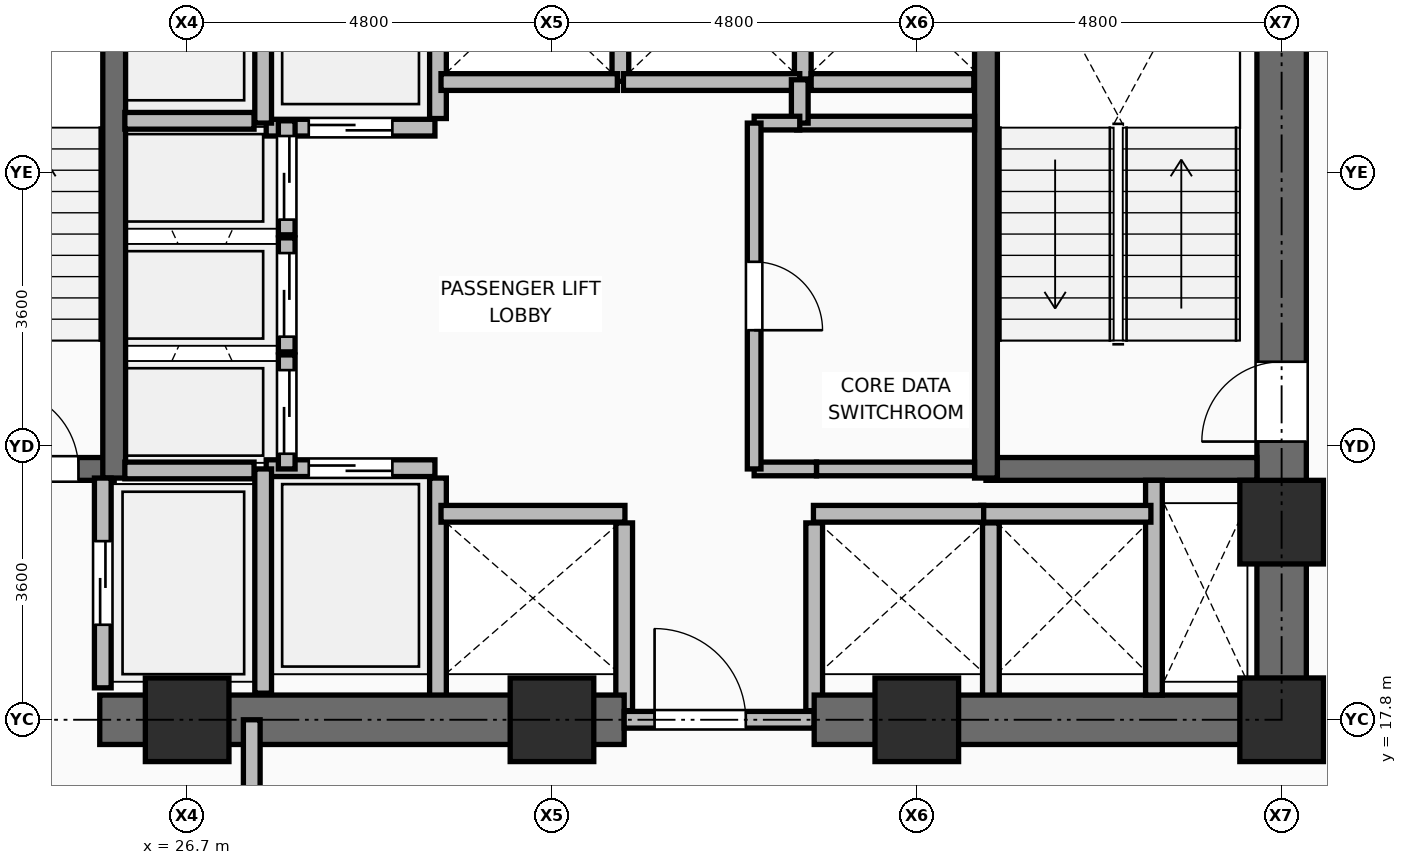
"""IFC4 building model, lengths in metres.
Left out: names, types, materials, properties, quantities, classifications, styles, units other than length and angle.
Written with IfcOpenShell. Run it as: python <this file> out.ifc"""

import sys

from ifc_helpers import new_model, si_unit, direction, frame, frame_2d, origin, origin_2d, place, context, subcontext, project, spatial, rectangle, extrude, element, fill, save


model = new_model("IFC4")
c1 = context("Model", 3, precision=1e-05, world=origin(), true_north=direction((0.0, 1.0)))
c2 = subcontext(c1, "Body", "Model", "MODEL_VIEW")
j1 = project(units=[si_unit("LENGTHUNIT", "METRE"), si_unit("PLANEANGLEUNIT", "RADIAN")], contexts=[c1])
p1 = place(None, origin())
s1 = spatial("IfcSite", under=j1, at=p1, CompositionType="ELEMENT")
p2 = place(p1, origin())
s2 = spatial("IfcBuilding", under=s1, at=p2, CompositionType="ELEMENT")
p3 = place(p2, frame((0.0, 0.0, 75.75)))
s3 = spatial("IfcBuildingStorey", under=s2, at=p3, CompositionType="ELEMENT", Elevation=75.75)
for number, where, z_axis, x_axis in (
    (1, (26.7, 17.8, 0.0), (0.0, 0.0, 1.0), (1.0, 0.0, 0.0)),
    (2, (31.5, 17.8, 0.0), (0.0, 0.0, 1.0), (1.0, 0.0, 0.0)),
    (3, (36.3, 17.8, 0.0), (0.0, 0.0, 1.0), (1.0, 0.0, 0.0)),
    (4, (41.1, 17.8, 0.0), (0.0, 0.0, 1.0), (1.0, 0.0, 0.0)),
    (5, (41.1, 20.4, 0.0), (0.0, 0.0, 1.0), (1.0, 0.0, 0.0)),
):
    element("IfcColumn", number, at=place(p3, frame(where, z_axis=z_axis, x_axis=x_axis)), inside=s3, PredefinedType="COLUMN", context=c2, shape_type="SweptSolid", body=[
        extrude(rectangle(XDim=1.1, YDim=1.1, at=origin_2d()), origin(), (0.0, 0.0, 1.0), 3.75),
    ])
p4 = place(p3, frame((30.0, 18.08, 0.0), z_axis=(0.0, 0.0, 1.0), x_axis=(0.0, 1.0, 0.0)))
e6 = element("IfcWall", 6, at=p4, inside=s3, PredefinedType="PARTITIONING", context=c2, shape_type="SweptSolid", body=[
    extrude(rectangle(XDim=2.9, YDim=0.22, at=frame_2d((1.45, 0.0))), origin(), (0.0, 0.0, 1.0), 3.545),
])
for number, where, z_axis, x_axis in (
    (7, (32.45, 17.92, 0.0), (0.0, 0.0, 1.0), (0.0, 1.0, 0.0)),
    (8, (34.95, 17.92, 0.0), (0.0, 0.0, 1.0), (0.0, 1.0, 0.0)),
):
    element("IfcWall", number, at=place(p3, frame(where, z_axis=z_axis, x_axis=x_axis)), inside=s3, PredefinedType="PARTITIONING", context=c2, shape_type="SweptSolid", body=[
        extrude(rectangle(XDim=2.47, YDim=0.22, at=frame_2d((1.235, 0.0))), origin(), (0.0, 0.0, 1.0), 2.928),
    ])
p5 = place(p3, frame((37.275, 18.08, 0.0), z_axis=(0.0, 0.0, 1.0), x_axis=(0.0, 1.0, 0.0)))
e9 = element("IfcWall", 9, at=p5, inside=s3, PredefinedType="PARTITIONING", context=c2, shape_type="SweptSolid", body=[
    extrude(rectangle(XDim=2.31, YDim=0.22, at=frame_2d((1.155, 0.0))), origin(), (0.0, 0.0, 1.0), 3.545),
])
p6 = place(p3, frame((30.0, 25.71, 0.0), z_axis=(0.0, 0.0, 1.0), x_axis=(0.0, 1.0, 0.0)))
e10 = element("IfcWall", 10, at=p6, inside=s3, PredefinedType="PARTITIONING", context=c2, shape_type="SweptSolid", body=[
    extrude(rectangle(XDim=2.73, YDim=0.22, at=frame_2d((1.365, 0.0))), origin(), (0.0, 0.0, 1.0), 3.545),
])
p7 = place(p3, frame((32.4, 26.2, 0.0), z_axis=(0.0, 0.0, 1.0), x_axis=(0.0, 1.0, 0.0)))
e11 = element("IfcWall", 11, at=p7, inside=s3, PredefinedType="PARTITIONING", context=c2, shape_type="SweptSolid", body=[
    extrude(rectangle(XDim=2.24, YDim=0.22, at=frame_2d((1.12, 0.0))), origin(), (0.0, 0.0, 1.0), 3.545),
])
p8 = place(p3, frame((34.8, 26.23, 0.0), z_axis=(0.0, 0.0, 1.0), x_axis=(0.0, 1.0, 0.0)))
e12 = element("IfcWall", 12, at=p8, inside=s3, PredefinedType="PARTITIONING", context=c2, shape_type="SweptSolid", body=[
    extrude(rectangle(XDim=2.21, YDim=0.22, at=frame_2d((1.105, 0.0))), origin(), (0.0, 0.0, 1.0), 3.545),
])
p9 = place(p3, frame((34.91, 26.19, 0.0), z_axis=(0.0, 0.0, 1.0), x_axis=(1.0, 0.0, 0.0)))
e13 = element("IfcWall", 13, at=p9, inside=s3, PredefinedType="PARTITIONING", context=c2, shape_type="SweptSolid", body=[
    extrude(rectangle(XDim=2.14, YDim=0.22, at=frame_2d((1.07, 0.0))), origin(), (0.0, 0.0, 1.0), 3.545),
])
p10 = place(p3, frame((25.55, 17.8, 0.0), z_axis=(0.0, 0.0, 1.0), x_axis=(1.0, 0.0, 0.0)))
e14 = element("IfcWall", 14, at=p10, inside=s3, PredefinedType="SHEAR", context=c2, shape_type="SweptSolid", body=[
    extrude(rectangle(XDim=6.9, YDim=0.65, at=frame_2d((3.45, 0.0))), origin(), (0.0, 0.0, 1.0), 3.57),
])
p11 = place(p3, frame((32.45, 17.8, 0.0), z_axis=(0.0, 0.0, 1.0), x_axis=(1.0, 0.0, 0.0)))
e15 = element("IfcWall", 15, at=p11, inside=s3, PredefinedType="PARTITIONING", context=c2, shape_type="SweptSolid", body=[
    extrude(rectangle(XDim=2.5, YDim=0.22, at=frame_2d((1.25, 0.0))), origin(), (0.0, 0.0, 1.0), 2.928),
])
p12 = place(p11, frame((0.4, 0.0, 0.0)))
e16 = element("IfcOpeningElement", 16, at=p12, cuts=e15, PredefinedType="OPENING", context=c2, shape_type="SweptSolid", body=[
    extrude(rectangle(XDim=1.2, YDim=2.1, at=frame_2d((0.6, 1.05))), frame((0.0, 0.12, 0.0), z_axis=(0.0, -1.0, 0.0), x_axis=(1.0, 0.0, 0.0)), (0.0, 0.0, 1.0), 0.24),
])
p13 = place(p3, frame((34.95, 17.8, 0.0), z_axis=(0.0, 0.0, 1.0), x_axis=(1.0, 0.0, 0.0)))
e17 = element("IfcWall", 17, at=p13, inside=s3, PredefinedType="SHEAR", context=c2, shape_type="SweptSolid", body=[
    extrude(rectangle(XDim=6.475, YDim=0.65, at=frame_2d((3.238, 0.0))), origin(), (0.0, 0.0, 1.0), 3.57),
])
p14 = place(p3, frame((41.1, 18.125, 0.0), z_axis=(0.0, 0.0, 1.0), x_axis=(0.0, 1.0, 0.0)))
e18 = element("IfcWall", 18, at=p14, inside=s3, PredefinedType="SHEAR", context=c2, shape_type="SweptSolid", body=[
    extrude(rectangle(XDim=14.0, YDim=0.65, at=frame_2d((7.0, 0.0))), origin(), (0.0, 0.0, 1.0), 3.57),
])
p15 = place(p14, frame((3.335, 0.0, 0.0)))
e19 = element("IfcOpeningElement", 19, at=p15, cuts=e18, PredefinedType="OPENING", context=c2, shape_type="SweptSolid", body=[
    extrude(rectangle(XDim=1.05, YDim=2.1, at=frame_2d((0.525, 1.05))), frame((0.0, 0.335, 0.0), z_axis=(0.0, -1.0, 0.0), x_axis=(1.0, 0.0, 0.0)), (0.0, 0.0, 1.0), 0.67),
])
p16 = place(p3, frame((22.225, 21.1, 0.0), z_axis=(0.0, 0.0, 1.0), x_axis=(1.0, 0.0, 0.0)))
e20 = element("IfcWall", 20, at=p16, inside=s3, PredefinedType="SHEAR", context=c2, shape_type="SweptSolid", body=[
    extrude(rectangle(XDim=3.515, YDim=0.3, at=frame_2d((1.757, 0.0))), origin(), (0.0, 0.0, 1.0), 3.57),
])
p17 = place(p16, frame((1.995, 0.0, 0.0)))
e21 = element("IfcOpeningElement", 21, at=p17, cuts=e20, PredefinedType="OPENING", context=c2, shape_type="SweptSolid", body=[
    extrude(rectangle(XDim=1.05, YDim=2.1, at=frame_2d((0.525, 1.05))), frame((0.0, 0.16, 0.0), z_axis=(0.0, -1.0, 0.0), x_axis=(1.0, 0.0, 0.0)), (0.0, 0.0, 1.0), 0.32),
])
p18 = place(p3, frame((25.74, 20.98, 0.0), z_axis=(0.0, 0.0, 1.0), x_axis=(0.0, 1.0, 0.0)))
e22 = element("IfcWall", 22, at=p18, inside=s3, PredefinedType="SHEAR", context=c2, shape_type="SweptSolid", body=[
    extrude(rectangle(XDim=7.99, YDim=0.3, at=frame_2d((3.995, 0.0))), origin(), (0.0, 0.0, 1.0), 3.57),
])
p19 = place(p3, frame((37.21, 21.1, 0.0), z_axis=(0.0, 0.0, 1.0), x_axis=(1.0, 0.0, 0.0)))
e23 = element("IfcWall", 23, at=p19, inside=s3, PredefinedType="SHEAR", context=c2, shape_type="SweptSolid", body=[
    extrude(rectangle(XDim=3.565, YDim=0.3, at=frame_2d((1.782, 0.0))), origin(), (0.0, 0.0, 1.0), 3.57),
])
p20 = place(p3, frame((37.21, 20.98, 0.0), z_axis=(0.0, 0.0, 1.0), x_axis=(0.0, 1.0, 0.0)))
e24 = element("IfcWall", 24, at=p20, inside=s3, PredefinedType="SHEAR", context=c2, shape_type="SweptSolid", body=[
    extrude(rectangle(XDim=7.99, YDim=0.3, at=frame_2d((3.995, 0.0))), origin(), (0.0, 0.0, 1.0), 3.57),
])
p21 = place(p3, frame((39.42, 18.125, 0.0), z_axis=(0.0, 0.0, 1.0), x_axis=(0.0, 1.0, 0.0)))
e25 = element("IfcWall", 25, at=p21, inside=s3, PredefinedType="PARTITIONING", context=c2, shape_type="SweptSolid", body=[
    extrude(rectangle(XDim=2.825, YDim=0.22, at=frame_2d((1.413, 0.0))), origin(), (0.0, 0.0, 1.0), 3.55),
])
p22 = place(p3, frame((25.59, 18.22, 0.0), z_axis=(0.0, 0.0, 1.0), x_axis=(0.0, 1.0, 0.0)))
e26 = element("IfcWall", 26, at=p22, inside=s3, PredefinedType="PARTITIONING", context=c2, shape_type="SweptSolid", body=[
    extrude(rectangle(XDim=2.76, YDim=0.22, at=frame_2d((1.38, 0.0))), origin(), (0.0, 0.0, 1.0), 3.55),
])
p23 = place(p22, frame((0.83, 0.0, 0.0)))
e27 = element("IfcOpeningElement", 27, at=p23, cuts=e26, PredefinedType="OPENING", context=c2, shape_type="SweptSolid", body=[
    extrude(rectangle(XDim=1.1, YDim=2.2, at=frame_2d((0.55, 1.1))), frame((0.0, 0.12, 0.0), z_axis=(0.0, -1.0, 0.0), x_axis=(1.0, 0.0, 0.0)), (0.0, 0.0, 1.0), 0.24),
])
p24 = place(p3, frame((27.74, 21.11, 0.0), z_axis=(0.0, 0.0, 1.0), x_axis=(1.0, 0.0, 0.0)))
e28 = element("IfcWall", 28, at=p24, inside=s3, PredefinedType="PARTITIONING", context=c2, shape_type="SweptSolid", body=[
    extrude(rectangle(XDim=2.22, YDim=0.22, at=frame_2d((1.11, 0.0))), origin(), (0.0, 0.0, 1.0), 3.55),
])
p25 = place(p24, frame((0.56, 0.0, 0.0)))
e29 = element("IfcOpeningElement", 29, at=p25, cuts=e28, PredefinedType="OPENING", context=c2, shape_type="SweptSolid", body=[
    extrude(rectangle(XDim=1.1, YDim=2.2, at=frame_2d((0.55, 1.1))), frame((0.0, 0.12, 0.0), z_axis=(0.0, -1.0, 0.0), x_axis=(1.0, 0.0, 0.0)), (0.0, 0.0, 1.0), 0.24),
])
p26 = place(p3, frame((27.74, 25.59, 0.0), z_axis=(0.0, 0.0, 1.0), x_axis=(1.0, 0.0, 0.0)))
e30 = element("IfcWall", 30, at=p26, inside=s3, PredefinedType="PARTITIONING", context=c2, shape_type="SweptSolid", body=[
    extrude(rectangle(XDim=2.22, YDim=0.22, at=frame_2d((1.11, 0.0))), origin(), (0.0, 0.0, 1.0), 3.55),
])
p27 = place(p26, frame((0.56, 0.0, 0.0)))
e31 = element("IfcOpeningElement", 31, at=p27, cuts=e30, PredefinedType="OPENING", context=c2, shape_type="SweptSolid", body=[
    extrude(rectangle(XDim=1.1, YDim=2.2, at=frame_2d((0.55, 1.1))), frame((0.0, 0.12, 0.0), z_axis=(0.0, -1.0, 0.0), x_axis=(1.0, 0.0, 0.0)), (0.0, 0.0, 1.0), 0.24),
])
p28 = place(p3, frame((30.04, 20.51, 0.0), z_axis=(0.0, 0.0, 1.0), x_axis=(1.0, 0.0, 0.0)))
e32 = element("IfcWall", 32, at=p28, inside=s3, PredefinedType="PARTITIONING", context=c2, shape_type="SweptSolid", body=[
    extrude(rectangle(XDim=2.42, YDim=0.22, at=frame_2d((1.21, 0.0))), origin(), (0.0, 0.0, 1.0), 3.55),
])
for number, where, z_axis, x_axis in (
    (33, (37.14, 20.51, 0.0), (0.0, 0.0, 1.0), (1.0, 0.0, 0.0)),
    (34, (34.94, 20.51, 0.0), (0.0, 0.0, 1.0), (1.0, 0.0, 0.0)),
):
    element("IfcWall", number, at=place(p3, frame(where, z_axis=z_axis, x_axis=x_axis)), inside=s3, PredefinedType="PARTITIONING", context=c2, shape_type="SweptSolid", body=[
        extrude(rectangle(XDim=2.24, YDim=0.22, at=frame_2d((1.12, 0.0))), origin(), (0.0, 0.0, 1.0), 3.55),
    ])
for number, where, z_axis, x_axis in (
    (35, (30.04, 26.19, 0.0), (0.0, 0.0, 1.0), (1.0, 0.0, 0.0)),
    (36, (32.44, 26.19, 0.0), (0.0, 0.0, 1.0), (1.0, 0.0, 0.0)),
):
    element("IfcWall", number, at=place(p3, frame(where, z_axis=z_axis, x_axis=x_axis)), inside=s3, PredefinedType="PARTITIONING", context=c2, shape_type="SweptSolid", body=[
        extrude(rectangle(XDim=2.32, YDim=0.22, at=frame_2d((1.16, 0.0))), origin(), (0.0, 0.0, 1.0), 3.55),
    ])
p29 = place(p3, frame((28.01, 21.1, 0.0), z_axis=(0.0, 0.0, 1.0), x_axis=(0.0, 1.0, 0.0)))
e37 = element("IfcWall", 37, at=p29, inside=s3, PredefinedType="PARTITIONING", context=c2, shape_type="SweptSolid", body=[
    extrude(rectangle(XDim=1.5, YDim=0.22, at=frame_2d((0.75, 0.0))), origin(), (0.0, 0.0, 1.0), 3.55),
])
p30 = place(p29, frame((0.2, 0.0, 0.0)))
e38 = element("IfcOpeningElement", 38, at=p30, cuts=e37, PredefinedType="OPENING", context=c2, shape_type="SweptSolid", body=[
    extrude(rectangle(XDim=1.1, YDim=2.2, at=frame_2d((0.55, 1.1))), frame((0.0, 0.12, 0.0), z_axis=(0.0, -1.0, 0.0), x_axis=(1.0, 0.0, 0.0)), (0.0, 0.0, 1.0), 0.24),
])
p31 = place(p3, frame((28.01, 22.64, 0.0), z_axis=(0.0, 0.0, 1.0), x_axis=(0.0, 1.0, 0.0)))
e39 = element("IfcWall", 39, at=p31, inside=s3, PredefinedType="PARTITIONING", context=c2, shape_type="SweptSolid", body=[
    extrude(rectangle(XDim=1.5, YDim=0.22, at=frame_2d((0.75, 0.0))), origin(), (0.0, 0.0, 1.0), 3.55),
])
p32 = place(p31, frame((0.2, 0.0, 0.0)))
e40 = element("IfcOpeningElement", 40, at=p32, cuts=e39, PredefinedType="OPENING", context=c2, shape_type="SweptSolid", body=[
    extrude(rectangle(XDim=1.1, YDim=2.2, at=frame_2d((0.55, 1.1))), frame((0.0, 0.12, 0.0), z_axis=(0.0, -1.0, 0.0), x_axis=(1.0, 0.0, 0.0)), (0.0, 0.0, 1.0), 0.24),
])
p33 = place(p3, frame((28.01, 24.18, 0.0), z_axis=(0.0, 0.0, 1.0), x_axis=(0.0, 1.0, 0.0)))
e41 = element("IfcWall", 41, at=p33, inside=s3, PredefinedType="PARTITIONING", context=c2, shape_type="SweptSolid", body=[
    extrude(rectangle(XDim=1.5, YDim=0.22, at=frame_2d((0.75, 0.0))), origin(), (0.0, 0.0, 1.0), 3.55),
])
p34 = place(p33, frame((0.2, 0.0, 0.0)))
e42 = element("IfcOpeningElement", 42, at=p34, cuts=e41, PredefinedType="OPENING", context=c2, shape_type="SweptSolid", body=[
    extrude(rectangle(XDim=1.1, YDim=2.2, at=frame_2d((0.55, 1.1))), frame((0.0, 0.12, 0.0), z_axis=(0.0, -1.0, 0.0), x_axis=(1.0, 0.0, 0.0)), (0.0, 0.0, 1.0), 0.24),
])
p35 = place(p3, frame((27.7, 18.15, 0.0), z_axis=(0.0, 0.0, 1.0), x_axis=(0.0, 1.0, 0.0)))
e43 = element("IfcWall", 43, at=p35, inside=s3, PredefinedType="PARTITIONING", context=c2, shape_type="SweptSolid", body=[
    extrude(rectangle(XDim=2.95, YDim=0.22, at=frame_2d((1.475, 0.0))), origin(), (0.0, 0.0, 1.0), 3.55),
])
p36 = place(p3, frame((27.7, 25.65, 0.0), z_axis=(0.0, 0.0, 1.0), x_axis=(0.0, 1.0, 0.0)))
e44 = element("IfcWall", 44, at=p36, inside=s3, PredefinedType="PARTITIONING", context=c2, shape_type="SweptSolid", body=[
    extrude(rectangle(XDim=3.0, YDim=0.22, at=frame_2d((1.5, 0.0))), origin(), (0.0, 0.0, 1.0), 3.55),
])
for number, where, z_axis, x_axis in (
    (45, (25.88, 21.08, 0.0), (0.0, 0.0, 1.0), (1.0, 0.0, 0.0)),
    (46, (25.88, 25.68, 0.0), (0.0, 0.0, 1.0), (1.0, 0.0, 0.0)),
):
    element("IfcWall", number, at=place(p3, frame(where, z_axis=z_axis, x_axis=x_axis)), inside=s3, PredefinedType="PARTITIONING", context=c2, shape_type="SweptSolid", body=[
        extrude(rectangle(XDim=1.7, YDim=0.22, at=frame_2d((0.85, 0.0))), origin(), (0.0, 0.0, 1.0), 3.55),
    ])
p37 = place(p3, frame((34.98, 21.1, 0.0), z_axis=(0.0, 0.0, 1.0), x_axis=(1.0, 0.0, 0.0)))
e47 = element("IfcWall", 47, at=p37, inside=s3, PredefinedType="PARTITIONING", context=c2, shape_type="SweptSolid", body=[
    extrude(rectangle(XDim=2.08, YDim=0.18, at=frame_2d((1.04, 0.0))), origin(), (0.0, 0.0, 1.0), 3.55),
])
p38 = place(p3, frame((34.72, 25.65, 0.0), z_axis=(0.0, 0.0, 1.0), x_axis=(1.0, 0.0, 0.0)))
e48 = element("IfcWall", 48, at=p38, inside=s3, PredefinedType="PARTITIONING", context=c2, shape_type="SweptSolid", body=[
    extrude(rectangle(XDim=2.34, YDim=0.18, at=frame_2d((1.17, 0.0))), origin(), (0.0, 0.0, 1.0), 3.55),
])
p39 = place(p3, frame((34.76, 25.65, 0.0), z_axis=(0.0, 0.0, 1.0), x_axis=(0.0, 1.0, 0.0)))
e49 = element("IfcWall", 49, at=p39, inside=s3, PredefinedType="PARTITIONING", context=c2, shape_type="SweptSolid", body=[
    extrude(rectangle(XDim=0.57, YDim=0.22, at=frame_2d((0.285, 0.0))), origin(), (0.0, 0.0, 1.0), 3.55),
])
p40 = place(p3, frame((34.16, 21.1, 0.0), z_axis=(0.0, 0.0, 1.0), x_axis=(1.0, 0.0, 0.0)))
e50 = element("IfcWall", 50, at=p40, inside=s3, PredefinedType="PARTITIONING", context=c2, shape_type="SweptSolid", body=[
    extrude(rectangle(XDim=0.82, YDim=0.18, at=frame_2d((0.41, 0.0))), origin(), (0.0, 0.0, 1.0), 3.55),
])
p41 = place(p3, frame((34.16, 25.65, 0.0), z_axis=(0.0, 0.0, 1.0), x_axis=(1.0, 0.0, 0.0)))
e51 = element("IfcWall", 51, at=p41, inside=s3, PredefinedType="PARTITIONING", context=c2, shape_type="SweptSolid", body=[
    extrude(rectangle(XDim=0.6, YDim=0.18, at=frame_2d((0.3, 0.0))), origin(), (0.0, 0.0, 1.0), 3.55),
])
p42 = place(p3, frame((34.16, 21.1, 0.0), z_axis=(0.0, 0.0, 1.0), x_axis=(0.0, 1.0, 0.0)))
e52 = element("IfcWall", 52, at=p42, inside=s3, PredefinedType="PARTITIONING", context=c2, shape_type="SweptSolid", body=[
    extrude(rectangle(XDim=4.55, YDim=0.18, at=frame_2d((2.275, 0.0))), origin(), (0.0, 0.0, 1.0), 3.55),
])
p43 = place(p42, frame((1.825, 0.0, 0.0)))
e53 = element("IfcOpeningElement", 53, at=p43, cuts=e52, PredefinedType="OPENING", context=c2, shape_type="SweptSolid", body=[
    extrude(rectangle(XDim=0.9, YDim=2.1, at=frame_2d((0.45, 1.05))), frame((0.0, 0.1, 0.0), z_axis=(0.0, -1.0, 0.0), x_axis=(1.0, 0.0, 0.0)), (0.0, 0.0, 1.0), 0.2),
])
p44 = place(p3, frame((27.55, 14.35, 0.0), z_axis=(0.0, 0.0, 1.0), x_axis=(0.0, 1.0, 0.0)))
e54 = element("IfcWall", 54, at=p44, inside=s3, PredefinedType="PARTITIONING", context=c2, shape_type="SweptSolid", body=[
    extrude(rectangle(XDim=3.45, YDim=0.22, at=frame_2d((1.725, 0.0))), origin(), (0.0, 0.0, 1.0), 2.928),
])
p45 = place(p44, frame((1.175, 0.0, 0.0)))
e55 = element("IfcOpeningElement", 55, at=p45, cuts=e54, PredefinedType="OPENING", context=c2, shape_type="SweptSolid", body=[
    extrude(rectangle(XDim=1.1, YDim=2.1, at=frame_2d((0.55, 1.05))), frame((0.0, 0.12, 0.0), z_axis=(0.0, -1.0, 0.0), x_axis=(1.0, 0.0, 0.0)), (0.0, 0.0, 1.0), 0.24),
])
p46 = place(p12, origin())
e56 = element("IfcDoor", 56, at=p46, inside=s3, OperationType="SINGLE_SWING_LEFT", PredefinedType="DOOR", context=c2, shape_type="SweptSolid", body=[
    extrude(rectangle(XDim=1.2, YDim=2.1, at=frame_2d((0.6, 1.05))), frame((0.0, 0.025, 0.0), z_axis=(0.0, -1.0, 0.0), x_axis=(1.0, 0.0, 0.0)), (0.0, 0.0, 1.0), 0.05),
])
fill(e16, e56)
p47 = place(p17, origin())
e57 = element("IfcDoor", 57, at=p47, inside=s3, OperationType="SINGLE_SWING_LEFT", PredefinedType="DOOR", context=c2, shape_type="SweptSolid", body=[
    extrude(rectangle(XDim=1.05, YDim=2.1, at=frame_2d((0.525, 1.05))), frame((0.0, 0.025, 0.0), z_axis=(0.0, -1.0, 0.0), x_axis=(1.0, 0.0, 0.0)), (0.0, 0.0, 1.0), 0.05),
])
fill(e21, e57)
p48 = place(p15, origin())
e58 = element("IfcDoor", 58, at=p48, inside=s3, OperationType="SINGLE_SWING_LEFT", PredefinedType="DOOR", context=c2, shape_type="SweptSolid", body=[
    extrude(rectangle(XDim=1.05, YDim=2.1, at=frame_2d((0.525, 1.05))), frame((0.0, 0.025, 0.0), z_axis=(0.0, -1.0, 0.0), x_axis=(1.0, 0.0, 0.0)), (0.0, 0.0, 1.0), 0.05),
])
fill(e19, e58)
p49 = place(p23, origin())
e59 = element("IfcDoor", 59, at=p49, inside=s3, OperationType="DOUBLE_DOOR_SLIDING", PredefinedType="DOOR", context=c2, shape_type="SweptSolid", body=[
    extrude(rectangle(XDim=1.1, YDim=2.2, at=frame_2d((0.55, 1.1))), frame((0.0, 0.025, 0.0), z_axis=(0.0, -1.0, 0.0), x_axis=(1.0, 0.0, 0.0)), (0.0, 0.0, 1.0), 0.05),
])
fill(e27, e59)
p50 = place(p25, origin())
e60 = element("IfcDoor", 60, at=p50, inside=s3, OperationType="DOUBLE_DOOR_SLIDING", PredefinedType="DOOR", context=c2, shape_type="SweptSolid", body=[
    extrude(rectangle(XDim=1.1, YDim=2.2, at=frame_2d((0.55, 1.1))), frame((0.0, 0.025, 0.0), z_axis=(0.0, -1.0, 0.0), x_axis=(1.0, 0.0, 0.0)), (0.0, 0.0, 1.0), 0.05),
])
fill(e29, e60)
p51 = place(p27, frame((1.1, 0.0, 0.0), z_axis=(0.0, 0.0, 1.0), x_axis=(-1.0, 0.0, 0.0)))
e61 = element("IfcDoor", 61, at=p51, inside=s3, OperationType="DOUBLE_DOOR_SLIDING", PredefinedType="DOOR", context=c2, shape_type="SweptSolid", body=[
    extrude(rectangle(XDim=1.1, YDim=2.2, at=frame_2d((0.55, 1.1))), frame((0.0, 0.025, 0.0), z_axis=(0.0, -1.0, 0.0), x_axis=(1.0, 0.0, 0.0)), (0.0, 0.0, 1.0), 0.05),
])
fill(e31, e61)
p52 = place(p30, frame((1.1, 0.0, 0.0), z_axis=(0.0, 0.0, 1.0), x_axis=(-1.0, 0.0, 0.0)))
e62 = element("IfcDoor", 62, at=p52, inside=s3, OperationType="DOUBLE_DOOR_SLIDING", PredefinedType="DOOR", context=c2, shape_type="SweptSolid", body=[
    extrude(rectangle(XDim=1.1, YDim=2.2, at=frame_2d((0.55, 1.1))), frame((0.0, 0.025, 0.0), z_axis=(0.0, -1.0, 0.0), x_axis=(1.0, 0.0, 0.0)), (0.0, 0.0, 1.0), 0.05),
])
fill(e38, e62)
p53 = place(p32, frame((1.1, 0.0, 0.0), z_axis=(0.0, 0.0, 1.0), x_axis=(-1.0, 0.0, 0.0)))
e63 = element("IfcDoor", 63, at=p53, inside=s3, OperationType="DOUBLE_DOOR_SLIDING", PredefinedType="DOOR", context=c2, shape_type="SweptSolid", body=[
    extrude(rectangle(XDim=1.1, YDim=2.2, at=frame_2d((0.55, 1.1))), frame((0.0, 0.025, 0.0), z_axis=(0.0, -1.0, 0.0), x_axis=(1.0, 0.0, 0.0)), (0.0, 0.0, 1.0), 0.05),
])
fill(e40, e63)
p54 = place(p34, frame((1.1, 0.0, 0.0), z_axis=(0.0, 0.0, 1.0), x_axis=(-1.0, 0.0, 0.0)))
e64 = element("IfcDoor", 64, at=p54, inside=s3, OperationType="DOUBLE_DOOR_SLIDING", PredefinedType="DOOR", context=c2, shape_type="SweptSolid", body=[
    extrude(rectangle(XDim=1.1, YDim=2.2, at=frame_2d((0.55, 1.1))), frame((0.0, 0.025, 0.0), z_axis=(0.0, -1.0, 0.0), x_axis=(1.0, 0.0, 0.0)), (0.0, 0.0, 1.0), 0.05),
])
fill(e42, e64)
p55 = place(p43, frame((0.9, 0.0, 0.0), z_axis=(0.0, 0.0, 1.0), x_axis=(-1.0, 0.0, 0.0)))
e65 = element("IfcDoor", 65, at=p55, inside=s3, OperationType="SINGLE_SWING_RIGHT", PredefinedType="DOOR", context=c2, shape_type="SweptSolid", body=[
    extrude(rectangle(XDim=0.9, YDim=2.1, at=frame_2d((0.45, 1.05))), frame((0.0, 0.025, 0.0), z_axis=(0.0, -1.0, 0.0), x_axis=(1.0, 0.0, 0.0)), (0.0, 0.0, 1.0), 0.05),
])
fill(e53, e65)
save(model, sys.argv[1])
